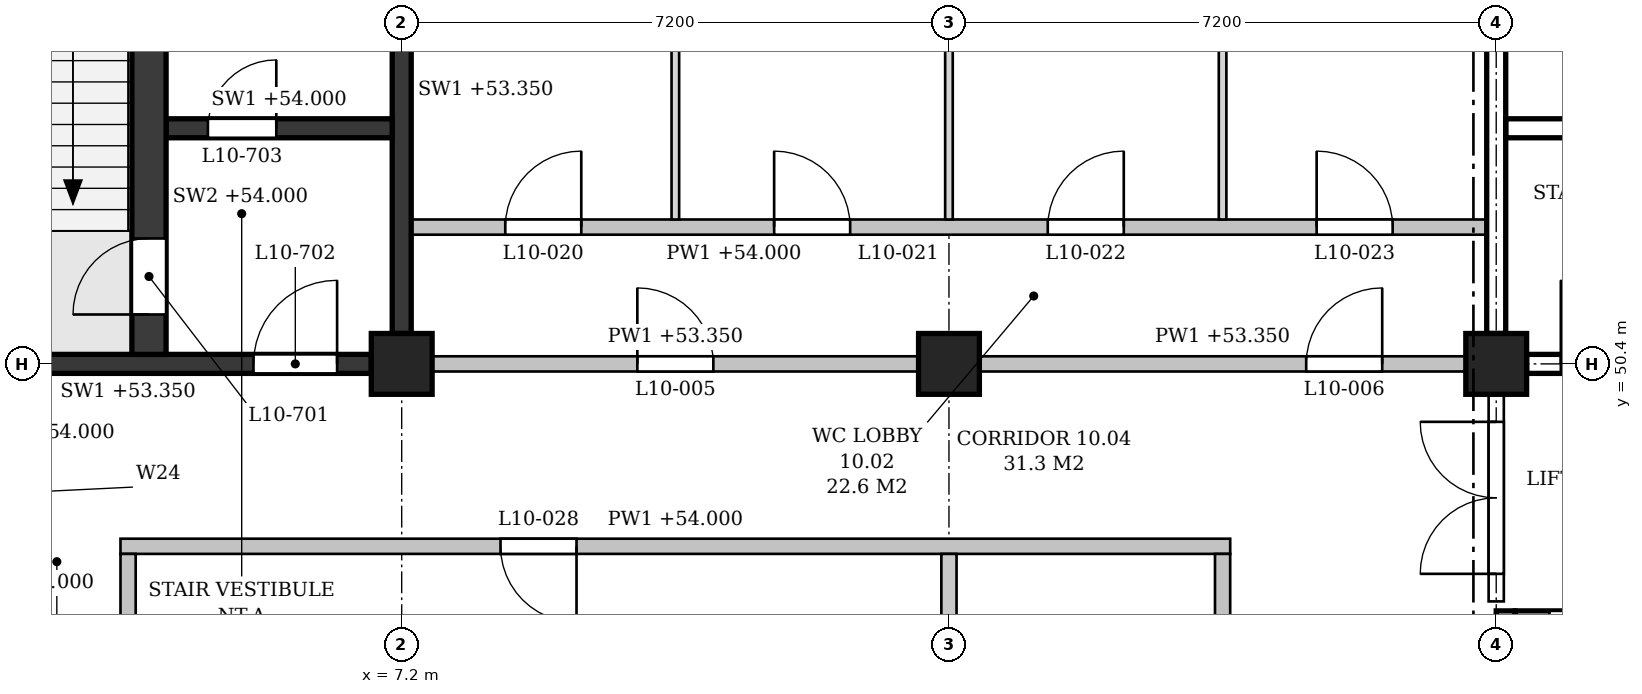
"""IFC4 building model, lengths in metres.
Left out: names, types, materials, properties, quantities, classifications, styles, units other than length and angle.
Written with IfcOpenShell. Run it as: python <this file> out.ifc"""

import sys

from ifc_helpers import new_model, si_unit, direction, frame, frame_2d, origin, origin_2d, place, context, subcontext, project, spatial, polyline, rectangle, outline, extrude, element, fill, save


model = new_model("IFC4")
c1 = context("Model", 3, precision=1e-05, world=origin(), true_north=direction((0.0, 1.0)))
c2 = subcontext(c1, "Body", "Model", "MODEL_VIEW")
j1 = project(units=[si_unit("LENGTHUNIT", "METRE"), si_unit("PLANEANGLEUNIT", "RADIAN")], contexts=[c1])
p1 = place(None, origin())
s1 = spatial("IfcSite", under=j1, at=p1, CompositionType="ELEMENT")
p2 = place(p1, origin())
s2 = spatial("IfcBuilding", under=s1, at=p2, CompositionType="ELEMENT")
p3 = place(p2, frame((0.0, 0.0, 49.8)))
s3 = spatial("IfcBuildingStorey", under=s2, at=p3, CompositionType="ELEMENT", Elevation=49.8)
for number, where, z_axis, x_axis in (
    (1, (7.2, 50.4, 0.0), (0.0, 0.0, 1.0), (1.0, 0.0, 0.0)),
    (2, (14.4, 50.4, 0.0), (0.0, 0.0, 1.0), (1.0, 0.0, 0.0)),
    (3, (21.6, 50.4, 0.0), (0.0, 0.0, 1.0), (1.0, 0.0, 0.0)),
):
    element("IfcColumn", number, at=place(p3, frame(where, z_axis=z_axis, x_axis=x_axis)), inside=s3, PredefinedType="COLUMN", context=c2, shape_type="SweptSolid", body=[
        extrude(rectangle(XDim=0.8, YDim=0.8, at=origin_2d()), origin(), (0.0, 0.0, 1.0), 4.5),
    ])
p4 = place(p3, frame((0.4, 50.4, 0.0), z_axis=(0.0, 0.0, 1.0), x_axis=(1.0, 0.0, 0.0)))
e4 = element("IfcWall", 4, at=p4, inside=s3, PredefinedType="SHEAR", context=c2, shape_type="SweptSolid", body=[
    extrude(rectangle(XDim=6.4, YDim=0.25, at=frame_2d((3.2, 0.0))), origin(), (0.0, 0.0, 1.0), 3.55),
])
p5 = place(p4, frame((4.85, 0.0, 0.0)))
e5 = element("IfcOpeningElement", 5, at=p5, cuts=e4, PredefinedType="OPENING", context=c2, shape_type="SweptSolid", body=[
    extrude(rectangle(XDim=1.1, YDim=2.1, at=frame_2d((0.55, 1.05))), frame((0.0, 0.135, 0.0), z_axis=(0.0, -1.0, 0.0), x_axis=(1.0, 0.0, 0.0)), (0.0, 0.0, 1.0), 0.27),
])
p6 = place(p3, frame((7.2, 50.8, 0.0), z_axis=(0.0, 0.0, 1.0), x_axis=(0.0, 1.0, 0.0)))
e6 = element("IfcWall", 6, at=p6, inside=s3, PredefinedType="SHEAR", context=c2, shape_type="SweptSolid", body=[
    extrude(rectangle(XDim=6.4, YDim=0.25, at=frame_2d((3.2, 0.0))), origin(), (0.0, 0.0, 1.0), 3.55),
])
p7 = place(p3, frame((3.875, 50.525, 0.0), z_axis=(0.0, 0.0, 1.0), x_axis=(0.0, 1.0, 0.0)))
e7 = element("IfcWall", 7, at=p7, inside=s3, PredefinedType="SHEAR", context=c2, shape_type="SweptSolid", body=[
    extrude(rectangle(XDim=6.925, YDim=0.45, at=frame_2d((3.462, 0.0))), origin(), (0.0, 0.0, 1.0), 4.2),
])
p8 = place(p7, frame((0.525, 0.0, 0.0)))
e8 = element("IfcOpeningElement", 8, at=p8, cuts=e7, PredefinedType="OPENING", context=c2, shape_type="SweptSolid", body=[
    extrude(rectangle(XDim=1.0, YDim=2.1, at=frame_2d((0.5, 1.05))), frame((0.0, 0.235, 0.0), z_axis=(0.0, -1.0, 0.0), x_axis=(1.0, 0.0, 0.0)), (0.0, 0.0, 1.0), 0.47),
])
p9 = place(p3, frame((4.1, 53.5, 0.0), z_axis=(0.0, 0.0, 1.0), x_axis=(1.0, 0.0, 0.0)))
e9 = element("IfcWall", 9, at=p9, inside=s3, PredefinedType="SHEAR", context=c2, shape_type="SweptSolid", body=[
    extrude(rectangle(XDim=2.975, YDim=0.25, at=frame_2d((1.487, 0.0))), origin(), (0.0, 0.0, 1.0), 4.2),
])
p10 = place(p9, frame((0.55, 0.0, 0.0)))
e10 = element("IfcOpeningElement", 10, at=p10, cuts=e9, PredefinedType="OPENING", context=c2, shape_type="SweptSolid", body=[
    extrude(rectangle(XDim=0.9, YDim=2.1, at=frame_2d((0.45, 1.05))), frame((0.0, 0.135, 0.0), z_axis=(0.0, -1.0, 0.0), x_axis=(1.0, 0.0, 0.0)), (0.0, 0.0, 1.0), 0.27),
])
p11 = place(p3, frame((22.0, 50.4, 0.0), z_axis=(0.0, 0.0, 1.0), x_axis=(1.0, 0.0, 0.0)))
e11 = element("IfcWall", 11, at=p11, inside=s3, PredefinedType="SHEAR", context=c2, shape_type="SweptSolid", body=[
    extrude(rectangle(XDim=6.4, YDim=0.25, at=frame_2d((3.2, 0.0))), origin(), (0.0, 0.0, 1.0), 3.55),
])
p12 = place(p11, frame((0.45, 0.0, 0.0)))
e12 = element("IfcOpeningElement", 12, at=p12, cuts=e11, PredefinedType="OPENING", context=c2, shape_type="SweptSolid", body=[
    extrude(rectangle(XDim=1.1, YDim=2.1, at=frame_2d((0.55, 1.05))), frame((0.0, 0.135, 0.0), z_axis=(0.0, -1.0, 0.0), x_axis=(1.0, 0.0, 0.0)), (0.0, 0.0, 1.0), 0.27),
])
p13 = place(p3, frame((21.6, 50.8, 0.0), z_axis=(0.0, 0.0, 1.0), x_axis=(0.0, 1.0, 0.0)))
e13 = element("IfcWall", 13, at=p13, inside=s3, PredefinedType="SHEAR", context=c2, shape_type="SweptSolid", body=[
    extrude(rectangle(XDim=6.4, YDim=0.25, at=frame_2d((3.2, 0.0))), origin(), (0.0, 0.0, 1.0), 3.55),
])
p14 = place(p3, frame((21.725, 53.5, 0.0), z_axis=(0.0, 0.0, 1.0), x_axis=(1.0, 0.0, 0.0)))
e14 = element("IfcWall", 14, at=p14, inside=s3, PredefinedType="SHEAR", context=c2, shape_type="SweptSolid", body=[
    extrude(rectangle(XDim=2.975, YDim=0.25, at=frame_2d((1.487, 0.0))), origin(), (0.0, 0.0, 1.0), 4.2),
])
p15 = place(p14, frame((1.525, 0.0, 0.0)))
e15 = element("IfcOpeningElement", 15, at=p15, cuts=e14, PredefinedType="OPENING", context=c2, shape_type="SweptSolid", body=[
    extrude(rectangle(XDim=0.9, YDim=2.1, at=frame_2d((0.45, 1.05))), frame((0.0, 0.135, 0.0), z_axis=(0.0, -1.0, 0.0), x_axis=(1.0, 0.0, 0.0)), (0.0, 0.0, 1.0), 0.27),
])
p16 = place(p3, frame((21.725, 43.6, -0.25), z_axis=(0.0, 0.0, 1.0), x_axis=(0.0, 1.0, 0.0)))
e16 = element("IfcWall", 16, at=p16, inside=s3, PredefinedType="SHEAR", context=c2, shape_type="SweptSolid", body=[
    extrude(rectangle(XDim=3.55, YDim=0.25, at=frame_2d((1.775, 0.0))), origin(), (0.0, 0.0, 1.0), 3.8),
])
p17 = place(p3, frame((21.85, 47.025, -0.25), z_axis=(0.0, 0.0, 1.0), x_axis=(1.0, 0.0, 0.0)))
e17 = element("IfcWall", 17, at=p17, inside=s3, PredefinedType="SHEAR", context=c2, shape_type="SweptSolid", body=[
    extrude(rectangle(XDim=2.0, YDim=0.25, at=frame_2d((1.0, 0.0))), origin(), (0.0, 0.0, 1.0), 4.45),
])
p18 = place(p17, frame((0.45, 0.0, 0.25)))
e18 = element("IfcOpeningElement", 18, at=p18, cuts=e17, PredefinedType="OPENING", context=c2, shape_type="SweptSolid", body=[
    extrude(rectangle(XDim=1.1, YDim=2.1, at=frame_2d((0.55, 1.05))), frame((0.0, 0.135, 0.0), z_axis=(0.0, -1.0, 0.0), x_axis=(1.0, 0.0, 0.0)), (0.0, 0.0, 1.0), 0.27),
])
p19 = place(p3, frame((3.5, 48.0, 0.0), z_axis=(0.0, 0.0, 1.0), x_axis=(1.0, 0.0, 0.0)))
e19 = element("IfcWall", 19, at=p19, inside=s3, PredefinedType="PARTITIONING", context=c2, shape_type="SweptSolid", body=[
    extrude(outline(polyline([(0.0, 0.0), (14.6, 0.0), (14.6, 4.2), (11.125, 4.2), (11.125, 3.55), (10.675, 3.55), (10.675, 4.2), (3.925, 4.2), (3.925, 3.55), (3.475, 3.55), (3.475, 4.2), (0.0, 4.2), (0.0, 0.0)])), frame((0.0, 0.1, 0.0), z_axis=(0.0, -1.0, 0.0), x_axis=(1.0, 0.0, 0.0)), (0.0, 0.0, 1.0), 0.2),
])
p20 = place(p19, frame((5.0, 0.0, 0.0)))
e20 = element("IfcOpeningElement", 20, at=p20, cuts=e19, PredefinedType="OPENING", context=c2, shape_type="SweptSolid", body=[
    extrude(rectangle(XDim=1.0, YDim=2.1, at=frame_2d((0.5, 1.05))), frame((0.0, 0.11, 0.0), z_axis=(0.0, -1.0, 0.0), x_axis=(1.0, 0.0, 0.0)), (0.0, 0.0, 1.0), 0.22),
])
p21 = place(p3, frame((7.6, 50.4, 0.0), z_axis=(0.0, 0.0, 1.0), x_axis=(1.0, 0.0, 0.0)))
e21 = element("IfcWall", 21, at=p21, inside=s3, PredefinedType="PARTITIONING", context=c2, shape_type="SweptSolid", body=[
    extrude(rectangle(XDim=6.4, YDim=0.2, at=frame_2d((3.2, 0.0))), origin(), (0.0, 0.0, 1.0), 3.55),
])
p22 = place(p21, frame((2.7, 0.0, 0.0)))
e22 = element("IfcOpeningElement", 22, at=p22, cuts=e21, PredefinedType="OPENING", context=c2, shape_type="SweptSolid", body=[
    extrude(rectangle(XDim=1.0, YDim=2.1, at=frame_2d((0.5, 1.05))), frame((0.0, 0.11, 0.0), z_axis=(0.0, -1.0, 0.0), x_axis=(1.0, 0.0, 0.0)), (0.0, 0.0, 1.0), 0.22),
])
p23 = place(p3, frame((14.8, 50.4, 0.0), z_axis=(0.0, 0.0, 1.0), x_axis=(1.0, 0.0, 0.0)))
e23 = element("IfcWall", 23, at=p23, inside=s3, PredefinedType="PARTITIONING", context=c2, shape_type="SweptSolid", body=[
    extrude(rectangle(XDim=6.4, YDim=0.2, at=frame_2d((3.2, 0.0))), origin(), (0.0, 0.0, 1.0), 3.55),
])
p24 = place(p23, frame((4.3, 0.0, 0.0)))
e24 = element("IfcOpeningElement", 24, at=p24, cuts=e23, PredefinedType="OPENING", context=c2, shape_type="SweptSolid", body=[
    extrude(rectangle(XDim=1.0, YDim=2.1, at=frame_2d((0.5, 1.05))), frame((0.0, 0.11, 0.0), z_axis=(0.0, -1.0, 0.0), x_axis=(1.0, 0.0, 0.0)), (0.0, 0.0, 1.0), 0.22),
])
p25 = place(p3, frame((7.325, 52.2, 0.0), z_axis=(0.0, 0.0, 1.0), x_axis=(1.0, 0.0, 0.0)))
e25 = element("IfcWall", 25, at=p25, inside=s3, PredefinedType="PARTITIONING", context=c2, shape_type="SweptSolid", body=[
    extrude(outline(polyline([(0.0, 0.0), (14.15, 0.0), (14.15, 3.55), (14.05, 3.55), (14.05, 4.2), (7.3, 4.2), (7.3, 3.55), (6.85, 3.55), (6.85, 4.2), (0.1, 4.2), (0.1, 3.55), (0.0, 3.55), (0.0, 0.0)])), frame((0.0, 0.1, 0.0), z_axis=(0.0, -1.0, 0.0), x_axis=(1.0, 0.0, 0.0)), (0.0, 0.0, 1.0), 0.2),
])
p26 = place(p25, frame((1.238, 0.0, 0.0)))
e26 = element("IfcOpeningElement", 26, at=p26, cuts=e25, PredefinedType="OPENING", context=c2, shape_type="SweptSolid", body=[
    extrude(rectangle(XDim=1.0, YDim=2.1, at=frame_2d((0.5, 1.05))), frame((0.0, 0.11, 0.0), z_axis=(0.0, -1.0, 0.0), x_axis=(1.0, 0.0, 0.0)), (0.0, 0.0, 1.0), 0.22),
])
p27 = place(p25, frame((4.775, 0.0, 0.0)))
e27 = element("IfcOpeningElement", 27, at=p27, cuts=e25, PredefinedType="OPENING", context=c2, shape_type="SweptSolid", body=[
    extrude(rectangle(XDim=1.0, YDim=2.1, at=frame_2d((0.5, 1.05))), frame((0.0, 0.11, 0.0), z_axis=(0.0, -1.0, 0.0), x_axis=(1.0, 0.0, 0.0)), (0.0, 0.0, 1.0), 0.22),
])
p28 = place(p25, frame((8.375, 0.0, 0.0)))
e28 = element("IfcOpeningElement", 28, at=p28, cuts=e25, PredefinedType="OPENING", context=c2, shape_type="SweptSolid", body=[
    extrude(rectangle(XDim=1.0, YDim=2.1, at=frame_2d((0.5, 1.05))), frame((0.0, 0.11, 0.0), z_axis=(0.0, -1.0, 0.0), x_axis=(1.0, 0.0, 0.0)), (0.0, 0.0, 1.0), 0.22),
])
p29 = place(p25, frame((11.913, 0.0, 0.0)))
e29 = element("IfcOpeningElement", 29, at=p29, cuts=e25, PredefinedType="OPENING", context=c2, shape_type="SweptSolid", body=[
    extrude(rectangle(XDim=1.0, YDim=2.1, at=frame_2d((0.5, 1.05))), frame((0.0, 0.11, 0.0), z_axis=(0.0, -1.0, 0.0), x_axis=(1.0, 0.0, 0.0)), (0.0, 0.0, 1.0), 0.22),
])
p30 = place(p3, frame((3.6, 46.8, 0.0), z_axis=(0.0, 0.0, 1.0), x_axis=(0.0, 1.0, 0.0)))
e30 = element("IfcWall", 30, at=p30, inside=s3, PredefinedType="PARTITIONING", context=c2, shape_type="SweptSolid", body=[
    extrude(rectangle(XDim=1.1, YDim=0.2, at=frame_2d((0.55, 0.0))), origin(), (0.0, 0.0, 1.0), 4.2),
])
p31 = place(p3, frame((10.8, 52.3, 0.0), z_axis=(0.0, 0.0, 1.0), x_axis=(0.0, 1.0, 0.0)))
e31 = element("IfcWall", 31, at=p31, inside=s3, PredefinedType="PARTITIONING", context=c2, shape_type="SweptSolid", body=[
    extrude(rectangle(XDim=5.15, YDim=0.1, at=frame_2d((2.575, 0.0))), origin(), (0.0, 0.0, 1.0), 3.55),
])
p32 = place(p3, frame((14.4, 43.6, 0.0), z_axis=(0.0, 0.0, 1.0), x_axis=(0.0, 1.0, 0.0)))
e32 = element("IfcWall", 32, at=p32, inside=s3, PredefinedType="PARTITIONING", context=c2, shape_type="SweptSolid", body=[
    extrude(rectangle(XDim=4.3, YDim=0.2, at=frame_2d((2.15, 0.0))), origin(), (0.0, 0.0, 1.0), 3.55),
])
p33 = place(p3, frame((14.4, 52.3, 0.0), z_axis=(0.0, 0.0, 1.0), x_axis=(0.0, 1.0, 0.0)))
e33 = element("IfcWall", 33, at=p33, inside=s3, PredefinedType="PARTITIONING", context=c2, shape_type="SweptSolid", body=[
    extrude(rectangle(XDim=4.9, YDim=0.1, at=frame_2d((2.45, 0.0))), origin(), (0.0, 0.0, 1.0), 3.55),
])
p34 = place(p3, frame((18.0, 40.9, 0.0), z_axis=(0.0, 0.0, 1.0), x_axis=(0.0, 1.0, 0.0)))
e34 = element("IfcWall", 34, at=p34, inside=s3, PredefinedType="PARTITIONING", context=c2, shape_type="SweptSolid", body=[
    extrude(outline(polyline([(0.0, 0.0), (7.0, 0.0), (7.0, 4.2), (2.525, 4.2), (2.525, 3.55), (2.075, 3.55), (2.075, 4.2), (0.0, 4.2), (0.0, 0.0)])), frame((0.0, 0.1, 0.0), z_axis=(0.0, -1.0, 0.0), x_axis=(1.0, 0.0, 0.0)), (0.0, 0.0, 1.0), 0.2),
])
p35 = place(p34, frame((3.0, 0.0, 0.0)))
e35 = element("IfcOpeningElement", 35, at=p35, cuts=e34, PredefinedType="OPENING", context=c2, shape_type="SweptSolid", body=[
    extrude(rectangle(XDim=1.0, YDim=2.1, at=frame_2d((0.5, 1.05))), frame((0.0, 0.11, 0.0), z_axis=(0.0, -1.0, 0.0), x_axis=(1.0, 0.0, 0.0)), (0.0, 0.0, 1.0), 0.22),
])
p36 = place(p3, frame((18.0, 52.3, 0.0), z_axis=(0.0, 0.0, 1.0), x_axis=(0.0, 1.0, 0.0)))
e36 = element("IfcWall", 36, at=p36, inside=s3, PredefinedType="PARTITIONING", context=c2, shape_type="SweptSolid", body=[
    extrude(rectangle(XDim=5.15, YDim=0.1, at=frame_2d((2.575, 0.0))), origin(), (0.0, 0.0, 1.0), 3.55),
])
p37 = place(p3, frame((21.6, 47.275, 0.0), z_axis=(0.0, 0.0, 1.0), x_axis=(0.0, 1.0, 0.0)))
e37 = element("IfcWall", 37, at=p37, inside=s3, PredefinedType="PARTITIONING", context=c2, shape_type="SweptSolid", body=[
    extrude(rectangle(XDim=2.725, YDim=0.2, at=frame_2d((1.363, 0.0))), origin(), (0.0, 0.0, 1.0), 3.55),
])
p38 = place(p37, frame((0.363, 0.0, 0.0)))
e38 = element("IfcOpeningElement", 38, at=p38, cuts=e37, PredefinedType="OPENING", context=c2, shape_type="SweptSolid", body=[
    extrude(rectangle(XDim=2.0, YDim=2.4, at=frame_2d((1.0, 1.2))), frame((0.0, 0.11, 0.0), z_axis=(0.0, -1.0, 0.0), x_axis=(1.0, 0.0, 0.0)), (0.0, 0.0, 1.0), 0.22),
])
p39 = place(p8, origin())
e39 = element("IfcDoor", 39, at=p39, inside=s3, OperationType="SINGLE_SWING_LEFT", PredefinedType="DOOR", context=c2, shape_type="SweptSolid", body=[
    extrude(rectangle(XDim=1.0, YDim=2.1, at=frame_2d((0.5, 1.05))), frame((0.0, 0.025, 0.0), z_axis=(0.0, -1.0, 0.0), x_axis=(1.0, 0.0, 0.0)), (0.0, 0.0, 1.0), 0.05),
])
fill(e8, e39)
p40 = place(p5, origin())
e40 = element("IfcDoor", 40, at=p40, inside=s3, OperationType="SINGLE_SWING_RIGHT", PredefinedType="DOOR", context=c2, shape_type="SweptSolid", body=[
    extrude(rectangle(XDim=1.1, YDim=2.1, at=frame_2d((0.55, 1.05))), frame((0.0, 0.025, 0.0), z_axis=(0.0, -1.0, 0.0), x_axis=(1.0, 0.0, 0.0)), (0.0, 0.0, 1.0), 0.05),
])
fill(e5, e40)
p41 = place(p10, origin())
e41 = element("IfcDoor", 41, at=p41, inside=s3, OperationType="SINGLE_SWING_RIGHT", PredefinedType="DOOR", context=c2, shape_type="SweptSolid", body=[
    extrude(rectangle(XDim=0.9, YDim=2.1, at=frame_2d((0.45, 1.05))), frame((0.0, 0.025, 0.0), z_axis=(0.0, -1.0, 0.0), x_axis=(1.0, 0.0, 0.0)), (0.0, 0.0, 1.0), 0.05),
])
fill(e10, e41)
p42 = place(p12, origin())
e42 = element("IfcDoor", 42, at=p42, inside=s3, OperationType="SINGLE_SWING_LEFT", PredefinedType="DOOR", context=c2, shape_type="SweptSolid", body=[
    extrude(rectangle(XDim=1.1, YDim=2.1, at=frame_2d((0.55, 1.05))), frame((0.0, 0.025, 0.0), z_axis=(0.0, -1.0, 0.0), x_axis=(1.0, 0.0, 0.0)), (0.0, 0.0, 1.0), 0.05),
])
fill(e12, e42)
p43 = place(p38, origin())
e43 = element("IfcDoor", 43, at=p43, inside=s3, OperationType="DOUBLE_DOOR_SINGLE_SWING", PredefinedType="DOOR", context=c2, shape_type="SweptSolid", body=[
    extrude(rectangle(XDim=2.0, YDim=2.4, at=frame_2d((1.0, 1.2))), frame((0.0, 0.025, 0.0), z_axis=(0.0, -1.0, 0.0), x_axis=(1.0, 0.0, 0.0)), (0.0, 0.0, 1.0), 0.05),
])
fill(e38, e43)
p44 = place(p22, origin())
e44 = element("IfcDoor", 44, at=p44, inside=s3, OperationType="SINGLE_SWING_LEFT", PredefinedType="DOOR", context=c2, shape_type="SweptSolid", body=[
    extrude(rectangle(XDim=1.0, YDim=2.1, at=frame_2d((0.5, 1.05))), frame((0.0, 0.025, 0.0), z_axis=(0.0, -1.0, 0.0), x_axis=(1.0, 0.0, 0.0)), (0.0, 0.0, 1.0), 0.05),
])
fill(e22, e44)
p45 = place(p24, origin())
e45 = element("IfcDoor", 45, at=p45, inside=s3, OperationType="SINGLE_SWING_RIGHT", PredefinedType="DOOR", context=c2, shape_type="SweptSolid", body=[
    extrude(rectangle(XDim=1.0, YDim=2.1, at=frame_2d((0.5, 1.05))), frame((0.0, 0.025, 0.0), z_axis=(0.0, -1.0, 0.0), x_axis=(1.0, 0.0, 0.0)), (0.0, 0.0, 1.0), 0.05),
])
fill(e24, e45)
p46 = place(p26, origin())
e46 = element("IfcDoor", 46, at=p46, inside=s3, OperationType="SINGLE_SWING_RIGHT", PredefinedType="DOOR", context=c2, shape_type="SweptSolid", body=[
    extrude(rectangle(XDim=1.0, YDim=2.1, at=frame_2d((0.5, 1.05))), frame((0.0, 0.025, 0.0), z_axis=(0.0, -1.0, 0.0), x_axis=(1.0, 0.0, 0.0)), (0.0, 0.0, 1.0), 0.05),
])
fill(e26, e46)
p47 = place(p27, origin())
e47 = element("IfcDoor", 47, at=p47, inside=s3, OperationType="SINGLE_SWING_LEFT", PredefinedType="DOOR", context=c2, shape_type="SweptSolid", body=[
    extrude(rectangle(XDim=1.0, YDim=2.1, at=frame_2d((0.5, 1.05))), frame((0.0, 0.025, 0.0), z_axis=(0.0, -1.0, 0.0), x_axis=(1.0, 0.0, 0.0)), (0.0, 0.0, 1.0), 0.05),
])
fill(e27, e47)
p48 = place(p28, origin())
e48 = element("IfcDoor", 48, at=p48, inside=s3, OperationType="SINGLE_SWING_RIGHT", PredefinedType="DOOR", context=c2, shape_type="SweptSolid", body=[
    extrude(rectangle(XDim=1.0, YDim=2.1, at=frame_2d((0.5, 1.05))), frame((0.0, 0.025, 0.0), z_axis=(0.0, -1.0, 0.0), x_axis=(1.0, 0.0, 0.0)), (0.0, 0.0, 1.0), 0.05),
])
fill(e28, e48)
p49 = place(p29, origin())
e49 = element("IfcDoor", 49, at=p49, inside=s3, OperationType="SINGLE_SWING_LEFT", PredefinedType="DOOR", context=c2, shape_type="SweptSolid", body=[
    extrude(rectangle(XDim=1.0, YDim=2.1, at=frame_2d((0.5, 1.05))), frame((0.0, 0.025, 0.0), z_axis=(0.0, -1.0, 0.0), x_axis=(1.0, 0.0, 0.0)), (0.0, 0.0, 1.0), 0.05),
])
fill(e29, e49)
p50 = place(p20, frame((1.0, 0.0, 0.0), z_axis=(0.0, 0.0, 1.0), x_axis=(-1.0, 0.0, 0.0)))
e50 = element("IfcDoor", 50, at=p50, inside=s3, OperationType="SINGLE_SWING_LEFT", PredefinedType="DOOR", context=c2, shape_type="SweptSolid", body=[
    extrude(rectangle(XDim=1.0, YDim=2.1, at=frame_2d((0.5, 1.05))), frame((0.0, 0.025, 0.0), z_axis=(0.0, -1.0, 0.0), x_axis=(1.0, 0.0, 0.0)), (0.0, 0.0, 1.0), 0.05),
])
fill(e20, e50)
save(model, sys.argv[1])
